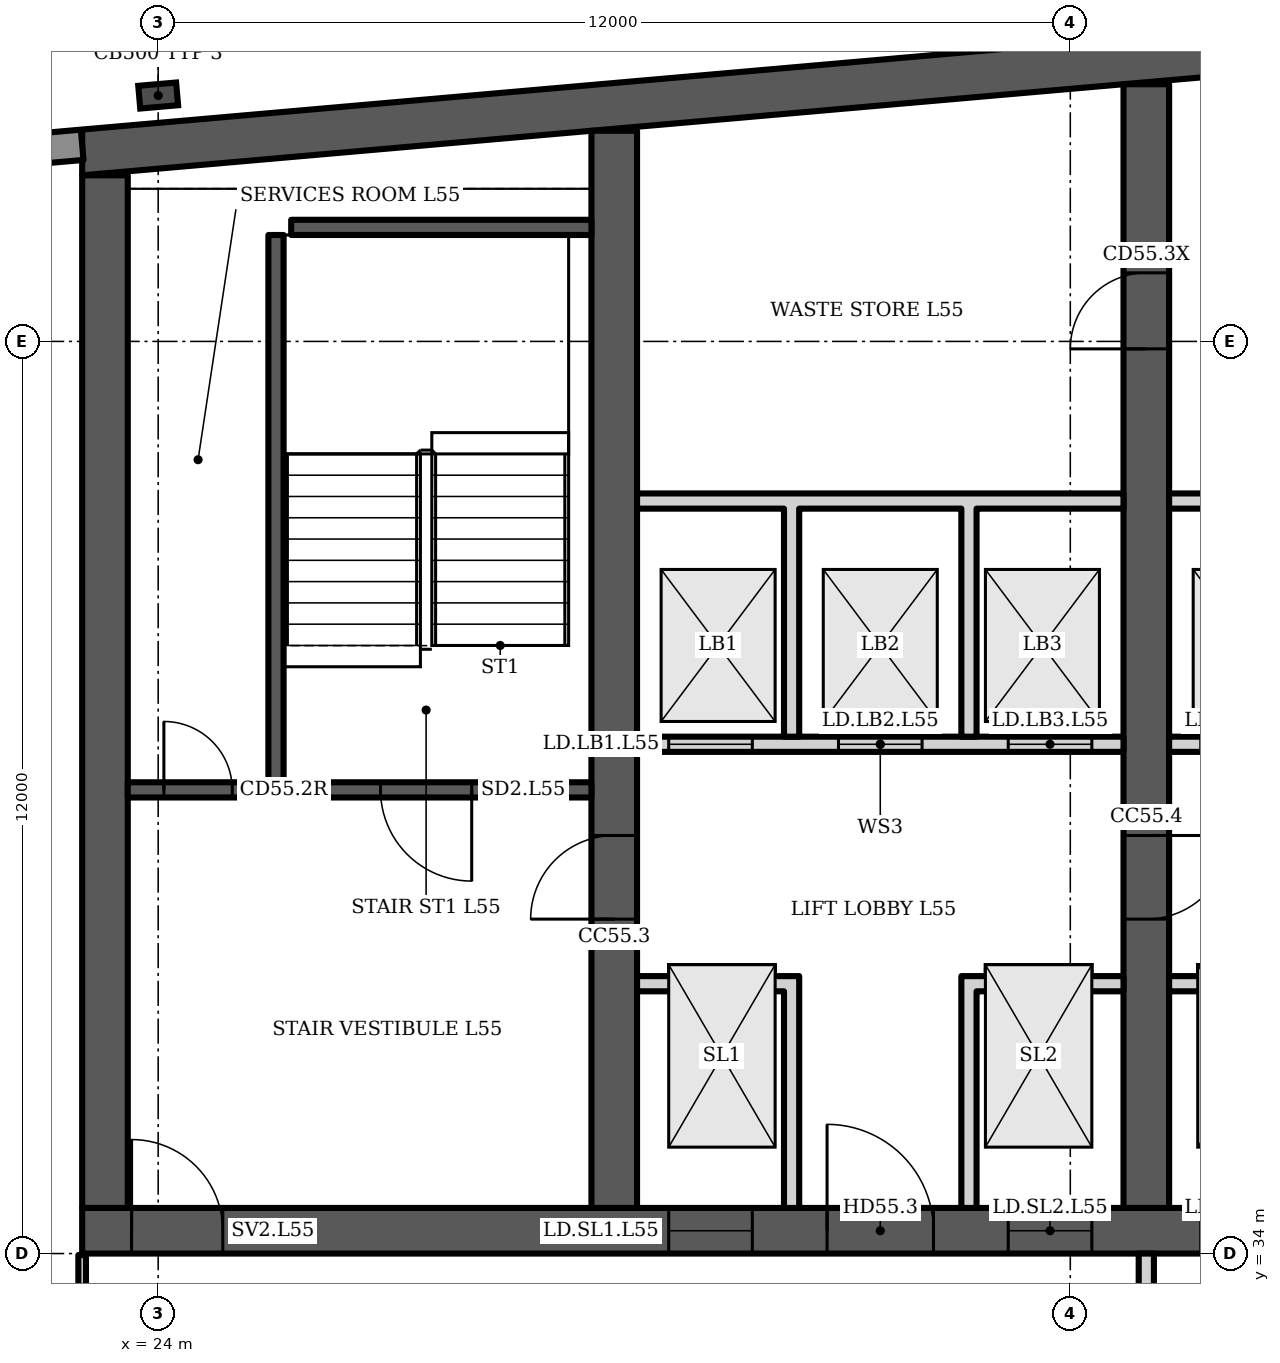
"""IFC4 building model, lengths in metres.
Left out: names, types, materials, properties, quantities, classifications, styles, units other than length and angle.
Written with IfcOpenShell. Run it as: python <this file> out.ifc"""

import sys

from ifc_helpers import new_model, si_unit, direction, frame, frame_2d, origin, origin_2d, place, context, subcontext, project, spatial, polyline, rectangle, i_section, outline, extrude, element, fill, save


model = new_model("IFC4")
c1 = context("Model", 3, precision=1e-05, world=origin(), true_north=direction((0.0, 1.0)))
c2 = subcontext(c1, "Body", "Model", "MODEL_VIEW")
j1 = project(units=[si_unit("LENGTHUNIT", "METRE"), si_unit("PLANEANGLEUNIT", "RADIAN")], contexts=[c1])
p1 = place(None, origin())
s1 = spatial("IfcSite", under=j1, at=p1, CompositionType="ELEMENT")
p2 = place(p1, origin())
s2 = spatial("IfcBuilding", under=s1, at=p2, CompositionType="ELEMENT")
p3 = place(p2, frame((0.0, 0.0, 221.5)))
s3 = spatial("IfcBuildingStorey", under=s2, at=p3, CompositionType="ELEMENT", Elevation=221.5)
p4 = place(p3, origin())
e1 = element("IfcWall", 1, at=p4, inside=s3, PredefinedType="SHEAR", context=c2, shape_type="SweptSolid", body=[
    extrude(outline(polyline([(23.0, 48.185), (40.5, 49.716), (58.0, 48.185), (58.0, 48.787), (40.5, 50.318), (23.0, 48.787), (23.0, 48.185)])), origin(), (0.0, 0.0, 1.0), 3.6),
])
p5 = place(p3, frame((23.0, 34.3, 0.0), z_axis=(0.0, 0.0, 1.0), x_axis=(1.0, 0.0, 0.0)))
e2 = element("IfcWall", 2, at=p5, inside=s3, PredefinedType="SHEAR", context=c2, shape_type="SweptSolid", body=[
    extrude(rectangle(XDim=35.0, YDim=0.6, at=frame_2d((17.5, 0.0))), origin(), (0.0, 0.0, 1.0), 3.6),
])
p6 = place(p5, frame((0.65, 0.0, 0.0)))
e3 = element("IfcOpeningElement", 3, at=p6, cuts=e2, PredefinedType="OPENING", context=c2, shape_type="SweptSolid", body=[
    extrude(rectangle(XDim=1.2, YDim=2.1, at=frame_2d((0.6, 1.05))), frame((0.0, 0.31, 0.0), z_axis=(0.0, -1.0, 0.0), x_axis=(1.0, 0.0, 0.0)), (0.0, 0.0, 1.0), 0.62),
])
p7 = place(p5, frame((7.717, 0.0, 0.0)))
e4 = element("IfcOpeningElement", 4, at=p7, cuts=e2, PredefinedType="OPENING", context=c2, shape_type="SweptSolid", body=[
    extrude(rectangle(XDim=1.1, YDim=2.1, at=frame_2d((0.55, 1.05))), frame((0.0, 0.31, 0.0), z_axis=(0.0, -1.0, 0.0), x_axis=(1.0, 0.0, 0.0)), (0.0, 0.0, 1.0), 0.62),
])
p8 = place(p5, frame((12.183, 0.0, 0.0)))
e5 = element("IfcOpeningElement", 5, at=p8, cuts=e2, PredefinedType="OPENING", context=c2, shape_type="SweptSolid", body=[
    extrude(rectangle(XDim=1.1, YDim=2.1, at=frame_2d((0.55, 1.05))), frame((0.0, 0.31, 0.0), z_axis=(0.0, -1.0, 0.0), x_axis=(1.0, 0.0, 0.0)), (0.0, 0.0, 1.0), 0.62),
])
p9 = place(p5, frame((9.8, 0.0, 0.0)))
e6 = element("IfcOpeningElement", 6, at=p9, cuts=e2, PredefinedType="OPENING", context=c2, shape_type="SweptSolid", body=[
    extrude(rectangle(XDim=1.4, YDim=2.1, at=frame_2d((0.7, 1.05))), frame((0.0, 0.31, 0.0), z_axis=(0.0, -1.0, 0.0), x_axis=(1.0, 0.0, 0.0)), (0.0, 0.0, 1.0), 0.62),
])
p10 = place(p5, frame((14.717, 0.0, 0.0)))
e7 = element("IfcOpeningElement", 7, at=p10, cuts=e2, PredefinedType="OPENING", context=c2, shape_type="SweptSolid", body=[
    extrude(rectangle(XDim=1.1, YDim=2.1, at=frame_2d((0.55, 1.05))), frame((0.0, 0.31, 0.0), z_axis=(0.0, -1.0, 0.0), x_axis=(1.0, 0.0, 0.0)), (0.0, 0.0, 1.0), 0.62),
])
p11 = place(p5, frame((16.95, 0.0, 0.0)))
e8 = element("IfcOpeningElement", 8, at=p11, cuts=e2, PredefinedType="OPENING", context=c2, shape_type="SweptSolid", body=[
    extrude(rectangle(XDim=1.1, YDim=2.1, at=frame_2d((0.55, 1.05))), frame((0.0, 0.31, 0.0), z_axis=(0.0, -1.0, 0.0), x_axis=(1.0, 0.0, 0.0)), (0.0, 0.0, 1.0), 0.62),
])
p12 = place(p5, frame((19.183, 0.0, 0.0)))
e9 = element("IfcOpeningElement", 9, at=p12, cuts=e2, PredefinedType="OPENING", context=c2, shape_type="SweptSolid", body=[
    extrude(rectangle(XDim=1.1, YDim=2.1, at=frame_2d((0.55, 1.05))), frame((0.0, 0.31, 0.0), z_axis=(0.0, -1.0, 0.0), x_axis=(1.0, 0.0, 0.0)), (0.0, 0.0, 1.0), 0.62),
])
p13 = place(p5, frame((26.15, 0.0, 0.0)))
e10 = element("IfcOpeningElement", 10, at=p13, cuts=e2, PredefinedType="OPENING", context=c2, shape_type="SweptSolid", body=[
    extrude(rectangle(XDim=1.2, YDim=2.1, at=frame_2d((0.6, 1.05))), frame((0.0, 0.31, 0.0), z_axis=(0.0, -1.0, 0.0), x_axis=(1.0, 0.0, 0.0)), (0.0, 0.0, 1.0), 0.62),
])
p14 = place(p5, frame((28.767, 0.0, 0.0)))
e11 = element("IfcOpeningElement", 11, at=p14, cuts=e2, PredefinedType="OPENING", context=c2, shape_type="SweptSolid", body=[
    extrude(rectangle(XDim=1.0, YDim=2.1, at=frame_2d((0.5, 1.05))), frame((0.0, 0.31, 0.0), z_axis=(0.0, -1.0, 0.0), x_axis=(1.0, 0.0, 0.0)), (0.0, 0.0, 1.0), 0.62),
])
p15 = place(p5, frame((33.083, 0.0, 0.0)))
e12 = element("IfcOpeningElement", 12, at=p15, cuts=e2, PredefinedType="OPENING", context=c2, shape_type="SweptSolid", body=[
    extrude(rectangle(XDim=1.0, YDim=2.1, at=frame_2d((0.5, 1.05))), frame((0.0, 0.31, 0.0), z_axis=(0.0, -1.0, 0.0), x_axis=(1.0, 0.0, 0.0)), (0.0, 0.0, 1.0), 0.62),
])
p16 = place(p5, frame((30.8, 0.0, 0.0)))
e13 = element("IfcOpeningElement", 13, at=p16, cuts=e2, PredefinedType="OPENING", context=c2, shape_type="SweptSolid", body=[
    extrude(rectangle(XDim=1.4, YDim=2.1, at=frame_2d((0.7, 1.05))), frame((0.0, 0.31, 0.0), z_axis=(0.0, -1.0, 0.0), x_axis=(1.0, 0.0, 0.0)), (0.0, 0.0, 1.0), 0.62),
])
p17 = place(p3, frame((23.3, 34.6, 0.0), z_axis=(0.0, 0.0, 1.0), x_axis=(0.0, 1.0, 0.0)))
e14 = element("IfcWall", 14, at=p17, inside=s3, PredefinedType="SHEAR", context=c2, shape_type="SweptSolid", body=[
    extrude(rectangle(XDim=13.585, YDim=0.6, at=frame_2d((6.792, 0.0))), origin(), (0.0, 0.0, 1.0), 3.6),
])
p18 = place(p3, frame((30.0, 34.6, 0.0), z_axis=(0.0, 0.0, 1.0), x_axis=(0.0, 1.0, 0.0)))
e15 = element("IfcWall", 15, at=p18, inside=s3, PredefinedType="SHEAR", context=c2, shape_type="SweptSolid", body=[
    extrude(rectangle(XDim=14.171, YDim=0.6, at=frame_2d((7.085, 0.0))), origin(), (0.0, 0.0, 1.0), 3.6),
])
p19 = place(p18, frame((3.8, 0.0, 0.0)))
e16 = element("IfcOpeningElement", 16, at=p19, cuts=e15, PredefinedType="OPENING", context=c2, shape_type="SweptSolid", body=[
    extrude(rectangle(XDim=1.1, YDim=2.1, at=frame_2d((0.55, 1.05))), frame((0.0, 0.31, 0.0), z_axis=(0.0, -1.0, 0.0), x_axis=(1.0, 0.0, 0.0)), (0.0, 0.0, 1.0), 0.62),
])
p20 = place(p3, frame((37.0, 34.6, 0.0), z_axis=(0.0, 0.0, 1.0), x_axis=(0.0, 1.0, 0.0)))
e17 = element("IfcWall", 17, at=p20, inside=s3, PredefinedType="SHEAR", context=c2, shape_type="SweptSolid", body=[
    extrude(rectangle(XDim=14.784, YDim=0.6, at=frame_2d((7.392, 0.0))), origin(), (0.0, 0.0, 1.0), 3.6),
])
p21 = place(p20, frame((11.302, 0.0, 0.0)))
e18 = element("IfcOpeningElement", 18, at=p21, cuts=e17, PredefinedType="OPENING", context=c2, shape_type="SweptSolid", body=[
    extrude(rectangle(XDim=1.0, YDim=2.1, at=frame_2d((0.5, 1.05))), frame((0.0, 0.31, 0.0), z_axis=(0.0, -1.0, 0.0), x_axis=(1.0, 0.0, 0.0)), (0.0, 0.0, 1.0), 0.62),
])
p22 = place(p20, frame((3.8, 0.0, 0.0)))
e19 = element("IfcOpeningElement", 19, at=p22, cuts=e17, PredefinedType="OPENING", context=c2, shape_type="SweptSolid", body=[
    extrude(rectangle(XDim=1.1, YDim=2.1, at=frame_2d((0.55, 1.05))), frame((0.0, 0.31, 0.0), z_axis=(0.0, -1.0, 0.0), x_axis=(1.0, 0.0, 0.0)), (0.0, 0.0, 1.0), 0.62),
])
p23 = place(p3, frame((24.0, 49.235, 0.0), z_axis=(0.0, 0.0, 1.0), x_axis=(-0.087156, 0.996197, 0.0)))
e20 = element("IfcColumn", 20, at=p23, inside=s3, PredefinedType="COLUMN", context=c2, shape_type="SweptSolid", body=[
    extrude(i_section(OverallWidth=0.3, OverallDepth=0.5, WebThickness=0.014, FlangeThickness=0.028, FilletRadius=0.027, at=origin_2d()), origin(), (0.0, 0.0, 1.0), 3.6),
])
p24 = place(p3, frame((23.0, 48.587, 0.0), z_axis=(0.0, 0.0, 1.0), x_axis=(-0.996194, -0.087168, 0.0)))
e21 = element("IfcWall", 21, at=p24, inside=s3, PredefinedType="SOLIDWALL", context=c2, shape_type="SweptSolid", body=[
    extrude(rectangle(XDim=2.994, YDim=0.4, at=frame_2d((1.497, 0.0))), origin(), (0.0, 0.0, 1.0), 3.2),
])
p25 = place(p3, frame((23.6, 40.1, 0.0), z_axis=(0.0, 0.0, 1.0), x_axis=(1.0, 0.0, 0.0)))
e22 = element("IfcWall", 22, at=p25, inside=s3, PredefinedType="SHEAR", context=c2, shape_type="SweptSolid", body=[
    extrude(rectangle(XDim=6.1, YDim=0.2, at=frame_2d((3.05, 0.0))), origin(), (0.0, 0.0, 1.0), 3.2),
])
p26 = place(p25, frame((3.325, 0.0, 0.0)))
e23 = element("IfcOpeningElement", 23, at=p26, cuts=e22, PredefinedType="OPENING", context=c2, shape_type="SweptSolid", body=[
    extrude(rectangle(XDim=1.2, YDim=2.1, at=frame_2d((0.6, 1.05))), frame((0.0, 0.11, 0.0), z_axis=(0.0, -1.0, 0.0), x_axis=(1.0, 0.0, 0.0)), (0.0, 0.0, 1.0), 0.22),
])
p27 = place(p25, frame((0.475, 0.0, 0.0)))
e24 = element("IfcOpeningElement", 24, at=p27, cuts=e22, PredefinedType="OPENING", context=c2, shape_type="SweptSolid", body=[
    extrude(rectangle(XDim=0.9, YDim=2.1, at=frame_2d((0.45, 1.05))), frame((0.0, 0.11, 0.0), z_axis=(0.0, -1.0, 0.0), x_axis=(1.0, 0.0, 0.0)), (0.0, 0.0, 1.0), 0.22),
])
p28 = place(p3, frame((25.55, 40.2, 0.0), z_axis=(0.0, 0.0, 1.0), x_axis=(0.0, 1.0, 0.0)))
e25 = element("IfcWall", 25, at=p28, inside=s3, PredefinedType="SHEAR", context=c2, shape_type="SweptSolid", body=[
    extrude(rectangle(XDim=7.2, YDim=0.2, at=frame_2d((3.6, 0.0))), origin(), (0.0, 0.0, 1.0), 3.2),
])
p29 = place(p3, frame((25.75, 47.5, 0.0), z_axis=(0.0, 0.0, 1.0), x_axis=(1.0, 0.0, 0.0)))
e26 = element("IfcWall", 26, at=p29, inside=s3, PredefinedType="SHEAR", context=c2, shape_type="SweptSolid", body=[
    extrude(rectangle(XDim=3.95, YDim=0.2, at=frame_2d((1.975, 0.0))), origin(), (0.0, 0.0, 1.0), 3.2),
])
p30 = place(p3, frame((30.3, 40.7, 0.0), z_axis=(0.0, 0.0, 1.0), x_axis=(1.0, 0.0, 0.0)))
e27 = element("IfcWall", 27, at=p30, inside=s3, PredefinedType="PARTITIONING", context=c2, shape_type="SweptSolid", body=[
    extrude(rectangle(XDim=6.4, YDim=0.2, at=frame_2d((3.2, 0.0))), origin(), (0.0, 0.0, 1.0), 3.2),
])
p31 = place(p30, frame((0.417, 0.0, 0.0)))
e28 = element("IfcOpeningElement", 28, at=p31, cuts=e27, PredefinedType="OPENING", context=c2, shape_type="SweptSolid", body=[
    extrude(rectangle(XDim=1.1, YDim=2.1, at=frame_2d((0.55, 1.05))), frame((0.0, 0.11, 0.0), z_axis=(0.0, -1.0, 0.0), x_axis=(1.0, 0.0, 0.0)), (0.0, 0.0, 1.0), 0.22),
])
p32 = place(p30, frame((2.65, 0.0, 0.0)))
e29 = element("IfcOpeningElement", 29, at=p32, cuts=e27, PredefinedType="OPENING", context=c2, shape_type="SweptSolid", body=[
    extrude(rectangle(XDim=1.1, YDim=2.1, at=frame_2d((0.55, 1.05))), frame((0.0, 0.11, 0.0), z_axis=(0.0, -1.0, 0.0), x_axis=(1.0, 0.0, 0.0)), (0.0, 0.0, 1.0), 0.22),
])
p33 = place(p30, frame((4.883, 0.0, 0.0)))
e30 = element("IfcOpeningElement", 30, at=p33, cuts=e27, PredefinedType="OPENING", context=c2, shape_type="SweptSolid", body=[
    extrude(rectangle(XDim=1.1, YDim=2.1, at=frame_2d((0.55, 1.05))), frame((0.0, 0.11, 0.0), z_axis=(0.0, -1.0, 0.0), x_axis=(1.0, 0.0, 0.0)), (0.0, 0.0, 1.0), 0.22),
])
p34 = place(p3, frame((0.0, 0.0, -0.0)))
e31 = element("IfcWall", 31, at=p34, inside=s3, PredefinedType="PARTITIONING", context=c2, shape_type="SweptSolid", body=[
    extrude(outline(polyline([(32.233, 37.45), (30.3, 37.45), (30.3, 37.65), (32.233, 37.65), (32.433, 37.65), (32.433, 34.6), (32.233, 34.6), (32.233, 37.45)])), origin(), (0.0, 0.0, 1.0), 3.2),
])
p35 = place(p3, frame((0.0, 0.0, -0.0)))
e32 = element("IfcWall", 32, at=p35, inside=s3, PredefinedType="PARTITIONING", context=c2, shape_type="SweptSolid", body=[
    extrude(outline(polyline([(34.567, 37.65), (34.767, 37.65), (36.7, 37.65), (36.7, 37.45), (34.767, 37.45), (34.767, 34.6), (34.567, 34.6), (34.567, 37.65)])), origin(), (0.0, 0.0, 1.0), 3.2),
])
p36 = place(p3, frame((0.0, 0.0, -0.0)))
e33 = element("IfcWall", 33, at=p36, inside=s3, PredefinedType="PARTITIONING", context=c2, shape_type="SweptSolid", body=[
    extrude(outline(polyline([(32.433, 40.8), (32.233, 40.8), (32.233, 43.8), (30.3, 43.8), (30.3, 44.0), (36.7, 44.0), (36.7, 43.8), (34.767, 43.8), (34.767, 40.8), (34.567, 40.8), (34.567, 43.8), (32.433, 43.8), (32.433, 40.8)])), origin(), (0.0, 0.0, 1.0), 3.2),
])
p37 = place(p3, frame((37.3, 40.7, 0.0), z_axis=(0.0, 0.0, 1.0), x_axis=(1.0, 0.0, 0.0)))
e34 = element("IfcWall", 34, at=p37, inside=s3, PredefinedType="PARTITIONING", context=c2, shape_type="SweptSolid", body=[
    extrude(rectangle(XDim=6.4, YDim=0.2, at=frame_2d((3.2, 0.0))), origin(), (0.0, 0.0, 1.0), 3.2),
])
p38 = place(p37, frame((0.417, 0.0, 0.0)))
e35 = element("IfcOpeningElement", 35, at=p38, cuts=e34, PredefinedType="OPENING", context=c2, shape_type="SweptSolid", body=[
    extrude(rectangle(XDim=1.1, YDim=2.1, at=frame_2d((0.55, 1.05))), frame((0.0, 0.11, 0.0), z_axis=(0.0, -1.0, 0.0), x_axis=(1.0, 0.0, 0.0)), (0.0, 0.0, 1.0), 0.22),
])
p39 = place(p37, frame((2.65, 0.0, 0.0)))
e36 = element("IfcOpeningElement", 36, at=p39, cuts=e34, PredefinedType="OPENING", context=c2, shape_type="SweptSolid", body=[
    extrude(rectangle(XDim=1.1, YDim=2.1, at=frame_2d((0.55, 1.05))), frame((0.0, 0.11, 0.0), z_axis=(0.0, -1.0, 0.0), x_axis=(1.0, 0.0, 0.0)), (0.0, 0.0, 1.0), 0.22),
])
p40 = place(p37, frame((4.883, 0.0, 0.0)))
e37 = element("IfcOpeningElement", 37, at=p40, cuts=e34, PredefinedType="OPENING", context=c2, shape_type="SweptSolid", body=[
    extrude(rectangle(XDim=1.1, YDim=2.1, at=frame_2d((0.55, 1.05))), frame((0.0, 0.11, 0.0), z_axis=(0.0, -1.0, 0.0), x_axis=(1.0, 0.0, 0.0)), (0.0, 0.0, 1.0), 0.22),
])
p41 = place(p3, frame((0.0, 0.0, -0.0)))
e38 = element("IfcWall", 38, at=p41, inside=s3, PredefinedType="PARTITIONING", context=c2, shape_type="SweptSolid", body=[
    extrude(outline(polyline([(41.567, 37.1), (39.433, 37.1), (39.433, 34.6), (39.233, 34.6), (39.233, 37.45), (37.3, 37.45), (37.3, 37.65), (39.233, 37.65), (39.433, 37.65), (39.433, 37.3), (41.567, 37.3), (41.567, 37.35), (41.767, 37.35), (43.7, 37.35), (43.7, 37.15), (41.767, 37.15), (41.767, 34.6), (41.567, 34.6), (41.567, 37.1)])), origin(), (0.0, 0.0, 1.0), 3.2),
])
p42 = place(p3, frame((0.0, 0.0, -0.0)))
e39 = element("IfcWall", 39, at=p42, inside=s3, PredefinedType="PARTITIONING", context=c2, shape_type="SweptSolid", body=[
    extrude(outline(polyline([(39.433, 40.8), (39.233, 40.8), (39.233, 43.8), (37.3, 43.8), (37.3, 44.0), (43.7, 44.0), (43.7, 43.8), (41.767, 43.8), (41.767, 40.8), (41.567, 40.8), (41.567, 43.8), (39.433, 43.8), (39.433, 40.8)])), origin(), (0.0, 0.0, 1.0), 3.2),
])
p43 = place(p3, frame((37.0, 30.5, 0.0), z_axis=(0.0, 0.0, 1.0), x_axis=(0.0, 1.0, 0.0)))
e40 = element("IfcWall", 40, at=p43, inside=s3, PredefinedType="PARTITIONING", context=c2, shape_type="SweptSolid", body=[
    extrude(rectangle(XDim=3.5, YDim=0.2, at=frame_2d((1.75, 0.0))), origin(), (0.0, 0.0, 1.0), 3.2),
])
p44 = place(p43, frame((1.2, 0.0, 0.0)))
e41 = element("IfcOpeningElement", 41, at=p44, cuts=e40, PredefinedType="OPENING", context=c2, shape_type="SweptSolid", body=[
    extrude(rectangle(XDim=1.1, YDim=2.1, at=frame_2d((0.55, 1.05))), frame((0.0, 0.11, 0.0), z_axis=(0.0, -1.0, 0.0), x_axis=(1.0, 0.0, 0.0)), (0.0, 0.0, 1.0), 0.22),
])
p45 = place(p3, frame((23.0, 24.275, 0.0), z_axis=(0.0, 0.0, 1.0), x_axis=(0.0, 1.0, 0.0)))
e42 = element("IfcWall", 42, at=p45, inside=s3, PredefinedType="PARTITIONING", context=c2, shape_type="SweptSolid", body=[
    extrude(rectangle(XDim=9.705, YDim=0.1, at=frame_2d((4.853, 0.0))), origin(), (0.0, 0.0, 1.0), 3.2),
])
p46 = place(p45, frame((5.105, 0.0, 0.0)))
e43 = element("IfcOpeningElement", 43, at=p46, cuts=e42, PredefinedType="OPENING", context=c2, shape_type="SweptSolid", body=[
    extrude(rectangle(XDim=1.0, YDim=2.1, at=frame_2d((0.5, 1.05))), frame((0.0, 0.06, 0.0), z_axis=(0.0, -1.0, 0.0), x_axis=(1.0, 0.0, 0.0)), (0.0, 0.0, 1.0), 0.12),
])
p47 = place(p26, origin())
e44 = element("IfcDoor", 44, at=p47, inside=s3, OperationType="SINGLE_SWING_RIGHT", PredefinedType="DOOR", context=c2, shape_type="SweptSolid", body=[
    extrude(rectangle(XDim=1.2, YDim=2.1, at=frame_2d((0.6, 1.05))), frame((0.0, 0.025, 0.0), z_axis=(0.0, -1.0, 0.0), x_axis=(1.0, 0.0, 0.0)), (0.0, 0.0, 1.0), 0.05),
])
fill(e23, e44)
p48 = place(p27, origin())
e45 = element("IfcDoor", 45, at=p48, inside=s3, OperationType="SINGLE_SWING_LEFT", PredefinedType="DOOR", context=c2, shape_type="SweptSolid", body=[
    extrude(rectangle(XDim=0.9, YDim=2.1, at=frame_2d((0.45, 1.05))), frame((0.0, 0.025, 0.0), z_axis=(0.0, -1.0, 0.0), x_axis=(1.0, 0.0, 0.0)), (0.0, 0.0, 1.0), 0.05),
])
fill(e24, e45)
p49 = place(p6, origin())
e46 = element("IfcDoor", 46, at=p49, inside=s3, OperationType="SINGLE_SWING_LEFT", PredefinedType="DOOR", context=c2, shape_type="SweptSolid", body=[
    extrude(rectangle(XDim=1.2, YDim=2.1, at=frame_2d((0.6, 1.05))), frame((0.0, 0.025, 0.0), z_axis=(0.0, -1.0, 0.0), x_axis=(1.0, 0.0, 0.0)), (0.0, 0.0, 1.0), 0.05),
])
fill(e3, e46)
p50 = place(p7, origin())
e47 = element("IfcDoor", 47, at=p50, inside=s3, OperationType="DOUBLE_DOOR_SLIDING", PredefinedType="DOOR", context=c2, shape_type="SweptSolid", body=[
    extrude(rectangle(XDim=1.1, YDim=2.1, at=frame_2d((0.55, 1.05))), frame((0.0, 0.025, 0.0), z_axis=(0.0, -1.0, 0.0), x_axis=(1.0, 0.0, 0.0)), (0.0, 0.0, 1.0), 0.05),
])
fill(e4, e47)
p51 = place(p8, origin())
e48 = element("IfcDoor", 48, at=p51, inside=s3, OperationType="DOUBLE_DOOR_SLIDING", PredefinedType="DOOR", context=c2, shape_type="SweptSolid", body=[
    extrude(rectangle(XDim=1.1, YDim=2.1, at=frame_2d((0.55, 1.05))), frame((0.0, 0.025, 0.0), z_axis=(0.0, -1.0, 0.0), x_axis=(1.0, 0.0, 0.0)), (0.0, 0.0, 1.0), 0.05),
])
fill(e5, e48)
p52 = place(p9, origin())
e49 = element("IfcDoor", 49, at=p52, inside=s3, OperationType="DOUBLE_DOOR_SINGLE_SWING", PredefinedType="DOOR", context=c2, shape_type="SweptSolid", body=[
    extrude(rectangle(XDim=1.4, YDim=2.1, at=frame_2d((0.7, 1.05))), frame((0.0, 0.025, 0.0), z_axis=(0.0, -1.0, 0.0), x_axis=(1.0, 0.0, 0.0)), (0.0, 0.0, 1.0), 0.05),
])
fill(e6, e49)
p53 = place(p31, origin())
e50 = element("IfcDoor", 50, at=p53, inside=s3, OperationType="DOUBLE_DOOR_SLIDING", PredefinedType="DOOR", context=c2, shape_type="SweptSolid", body=[
    extrude(rectangle(XDim=1.1, YDim=2.1, at=frame_2d((0.55, 1.05))), frame((0.0, 0.025, 0.0), z_axis=(0.0, -1.0, 0.0), x_axis=(1.0, 0.0, 0.0)), (0.0, 0.0, 1.0), 0.05),
])
fill(e28, e50)
p54 = place(p32, origin())
e51 = element("IfcDoor", 51, at=p54, inside=s3, OperationType="DOUBLE_DOOR_SLIDING", PredefinedType="DOOR", context=c2, shape_type="SweptSolid", body=[
    extrude(rectangle(XDim=1.1, YDim=2.1, at=frame_2d((0.55, 1.05))), frame((0.0, 0.025, 0.0), z_axis=(0.0, -1.0, 0.0), x_axis=(1.0, 0.0, 0.0)), (0.0, 0.0, 1.0), 0.05),
])
fill(e29, e51)
p55 = place(p33, origin())
e52 = element("IfcDoor", 52, at=p55, inside=s3, OperationType="DOUBLE_DOOR_SLIDING", PredefinedType="DOOR", context=c2, shape_type="SweptSolid", body=[
    extrude(rectangle(XDim=1.1, YDim=2.1, at=frame_2d((0.55, 1.05))), frame((0.0, 0.025, 0.0), z_axis=(0.0, -1.0, 0.0), x_axis=(1.0, 0.0, 0.0)), (0.0, 0.0, 1.0), 0.05),
])
fill(e30, e52)
p56 = place(p21, origin())
e53 = element("IfcDoor", 53, at=p56, inside=s3, OperationType="SINGLE_SWING_LEFT", PredefinedType="DOOR", context=c2, shape_type="SweptSolid", body=[
    extrude(rectangle(XDim=1.0, YDim=2.1, at=frame_2d((0.5, 1.05))), frame((0.0, 0.025, 0.0), z_axis=(0.0, -1.0, 0.0), x_axis=(1.0, 0.0, 0.0)), (0.0, 0.0, 1.0), 0.05),
])
fill(e18, e53)
p57 = place(p19, origin())
e54 = element("IfcDoor", 54, at=p57, inside=s3, OperationType="SINGLE_SWING_LEFT", PredefinedType="DOOR", context=c2, shape_type="SweptSolid", body=[
    extrude(rectangle(XDim=1.1, YDim=2.1, at=frame_2d((0.55, 1.05))), frame((0.0, 0.025, 0.0), z_axis=(0.0, -1.0, 0.0), x_axis=(1.0, 0.0, 0.0)), (0.0, 0.0, 1.0), 0.05),
])
fill(e16, e54)
p58 = place(p22, origin())
e55 = element("IfcDoor", 55, at=p58, inside=s3, OperationType="SINGLE_SWING_RIGHT", PredefinedType="DOOR", context=c2, shape_type="SweptSolid", body=[
    extrude(rectangle(XDim=1.1, YDim=2.1, at=frame_2d((0.55, 1.05))), frame((0.0, 0.025, 0.0), z_axis=(0.0, -1.0, 0.0), x_axis=(1.0, 0.0, 0.0)), (0.0, 0.0, 1.0), 0.05),
])
fill(e19, e55)
save(model, sys.argv[1])
